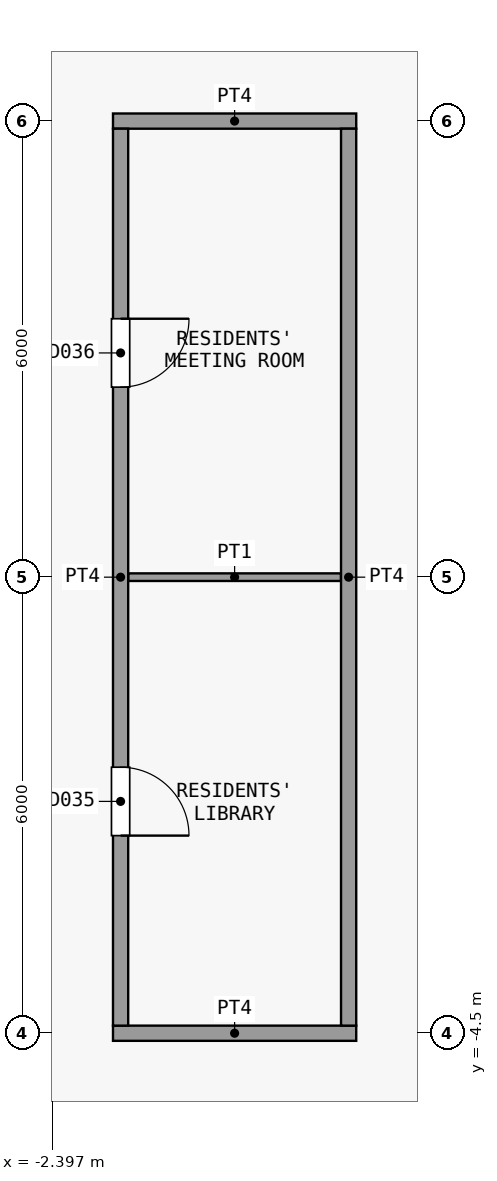
"""IFC4 building model, lengths in metres.
Left out: names, types, materials, properties, quantities, classifications, styles, units other than length and angle.
Written with IfcOpenShell. Run it as: python <this file> out.ifc"""

import sys

from ifc_helpers import new_model, si_unit, direction, frame, frame_2d, origin, place, context, subcontext, project, spatial, rectangle, extrude, element, fill, save


model = new_model("IFC4")
c1 = context("Model", 3, precision=1e-05, world=origin(), true_north=direction((0.0, 1.0)))
c2 = subcontext(c1, "Body", "Model", "MODEL_VIEW")
j1 = project(units=[si_unit("LENGTHUNIT", "METRE"), si_unit("PLANEANGLEUNIT", "RADIAN")], contexts=[c1])
p1 = place(None, origin())
s1 = spatial("IfcSite", under=j1, at=p1, CompositionType="ELEMENT")
p2 = place(p1, origin())
s2 = spatial("IfcBuilding", under=s1, at=p2, CompositionType="ELEMENT")
p3 = place(p2, frame((0.0, 0.0, 192.5)))
s3 = spatial("IfcBuildingStorey", under=s2, at=p3, CompositionType="ELEMENT", Elevation=192.5)
p4 = place(p3, frame((-1.6, -4.5, 0.0), z_axis=(0.0, 0.0, 1.0), x_axis=(1.0, 0.0, 0.0)))
e1 = element("IfcWall", 1, at=p4, inside=s3, PredefinedType="PARTITIONING", context=c2, shape_type="SweptSolid", body=[
    extrude(rectangle(XDim=3.2, YDim=0.2, at=frame_2d((1.6, 0.0))), origin(), (0.0, 0.0, 1.0), 3.3),
])
p5 = place(p3, frame((-1.4, 1.5, 0.0), z_axis=(0.0, 0.0, 1.0), x_axis=(1.0, 0.0, 0.0)))
e2 = element("IfcWall", 2, at=p5, inside=s3, PredefinedType="PARTITIONING", context=c2, shape_type="SweptSolid", body=[
    extrude(rectangle(XDim=2.8, YDim=0.1, at=frame_2d((1.4, 0.0))), origin(), (0.0, 0.0, 1.0), 3.3),
])
p6 = place(p3, frame((-1.6, 7.5, 0.0), z_axis=(0.0, 0.0, 1.0), x_axis=(1.0, 0.0, 0.0)))
e3 = element("IfcWall", 3, at=p6, inside=s3, PredefinedType="PARTITIONING", context=c2, shape_type="SweptSolid", body=[
    extrude(rectangle(XDim=3.2, YDim=0.2, at=frame_2d((1.6, 0.0))), origin(), (0.0, 0.0, 1.0), 3.3),
])
p7 = place(p3, frame((-1.5, -4.4, 0.0), z_axis=(0.0, 0.0, 1.0), x_axis=(0.0, 1.0, 0.0)))
e4 = element("IfcWall", 4, at=p7, inside=s3, PredefinedType="PARTITIONING", context=c2, shape_type="SweptSolid", body=[
    extrude(rectangle(XDim=11.8, YDim=0.2, at=frame_2d((5.9, 0.0))), origin(), (0.0, 0.0, 1.0), 3.3),
])
p8 = place(p7, frame((2.5, 0.0, 0.0)))
e5 = element("IfcOpeningElement", 5, at=p8, cuts=e4, PredefinedType="OPENING", context=c2, shape_type="SweptSolid", body=[
    extrude(rectangle(XDim=0.9, YDim=2.1, at=frame_2d((0.45, 1.05))), frame((0.0, 0.11, 0.0), z_axis=(0.0, -1.0, 0.0), x_axis=(1.0, 0.0, 0.0)), (0.0, 0.0, 1.0), 0.22),
])
p9 = place(p7, frame((8.4, 0.0, 0.0)))
e6 = element("IfcOpeningElement", 6, at=p9, cuts=e4, PredefinedType="OPENING", context=c2, shape_type="SweptSolid", body=[
    extrude(rectangle(XDim=0.9, YDim=2.1, at=frame_2d((0.45, 1.05))), frame((0.0, 0.11, 0.0), z_axis=(0.0, -1.0, 0.0), x_axis=(1.0, 0.0, 0.0)), (0.0, 0.0, 1.0), 0.22),
])
p10 = place(p3, frame((1.5, -4.4, 0.0), z_axis=(0.0, 0.0, 1.0), x_axis=(0.0, 1.0, 0.0)))
e7 = element("IfcWall", 7, at=p10, inside=s3, PredefinedType="PARTITIONING", context=c2, shape_type="SweptSolid", body=[
    extrude(rectangle(XDim=11.8, YDim=0.2, at=frame_2d((5.9, 0.0))), origin(), (0.0, 0.0, 1.0), 3.3),
])
p11 = place(p8, origin())
e8 = element("IfcDoor", 8, at=p11, inside=s3, OperationType="SINGLE_SWING_LEFT", PredefinedType="DOOR", context=c2, shape_type="SweptSolid", body=[
    extrude(rectangle(XDim=0.9, YDim=2.1, at=frame_2d((0.45, 1.05))), frame((0.0, 0.025, 0.0), z_axis=(0.0, -1.0, 0.0), x_axis=(1.0, 0.0, 0.0)), (0.0, 0.0, 1.0), 0.05),
])
fill(e5, e8)
p12 = place(p9, origin())
e9 = element("IfcDoor", 9, at=p12, inside=s3, OperationType="SINGLE_SWING_RIGHT", PredefinedType="DOOR", context=c2, shape_type="SweptSolid", body=[
    extrude(rectangle(XDim=0.9, YDim=2.1, at=frame_2d((0.45, 1.05))), frame((0.0, 0.025, 0.0), z_axis=(0.0, -1.0, 0.0), x_axis=(1.0, 0.0, 0.0)), (0.0, 0.0, 1.0), 0.05),
])
fill(e6, e9)
save(model, sys.argv[1])
